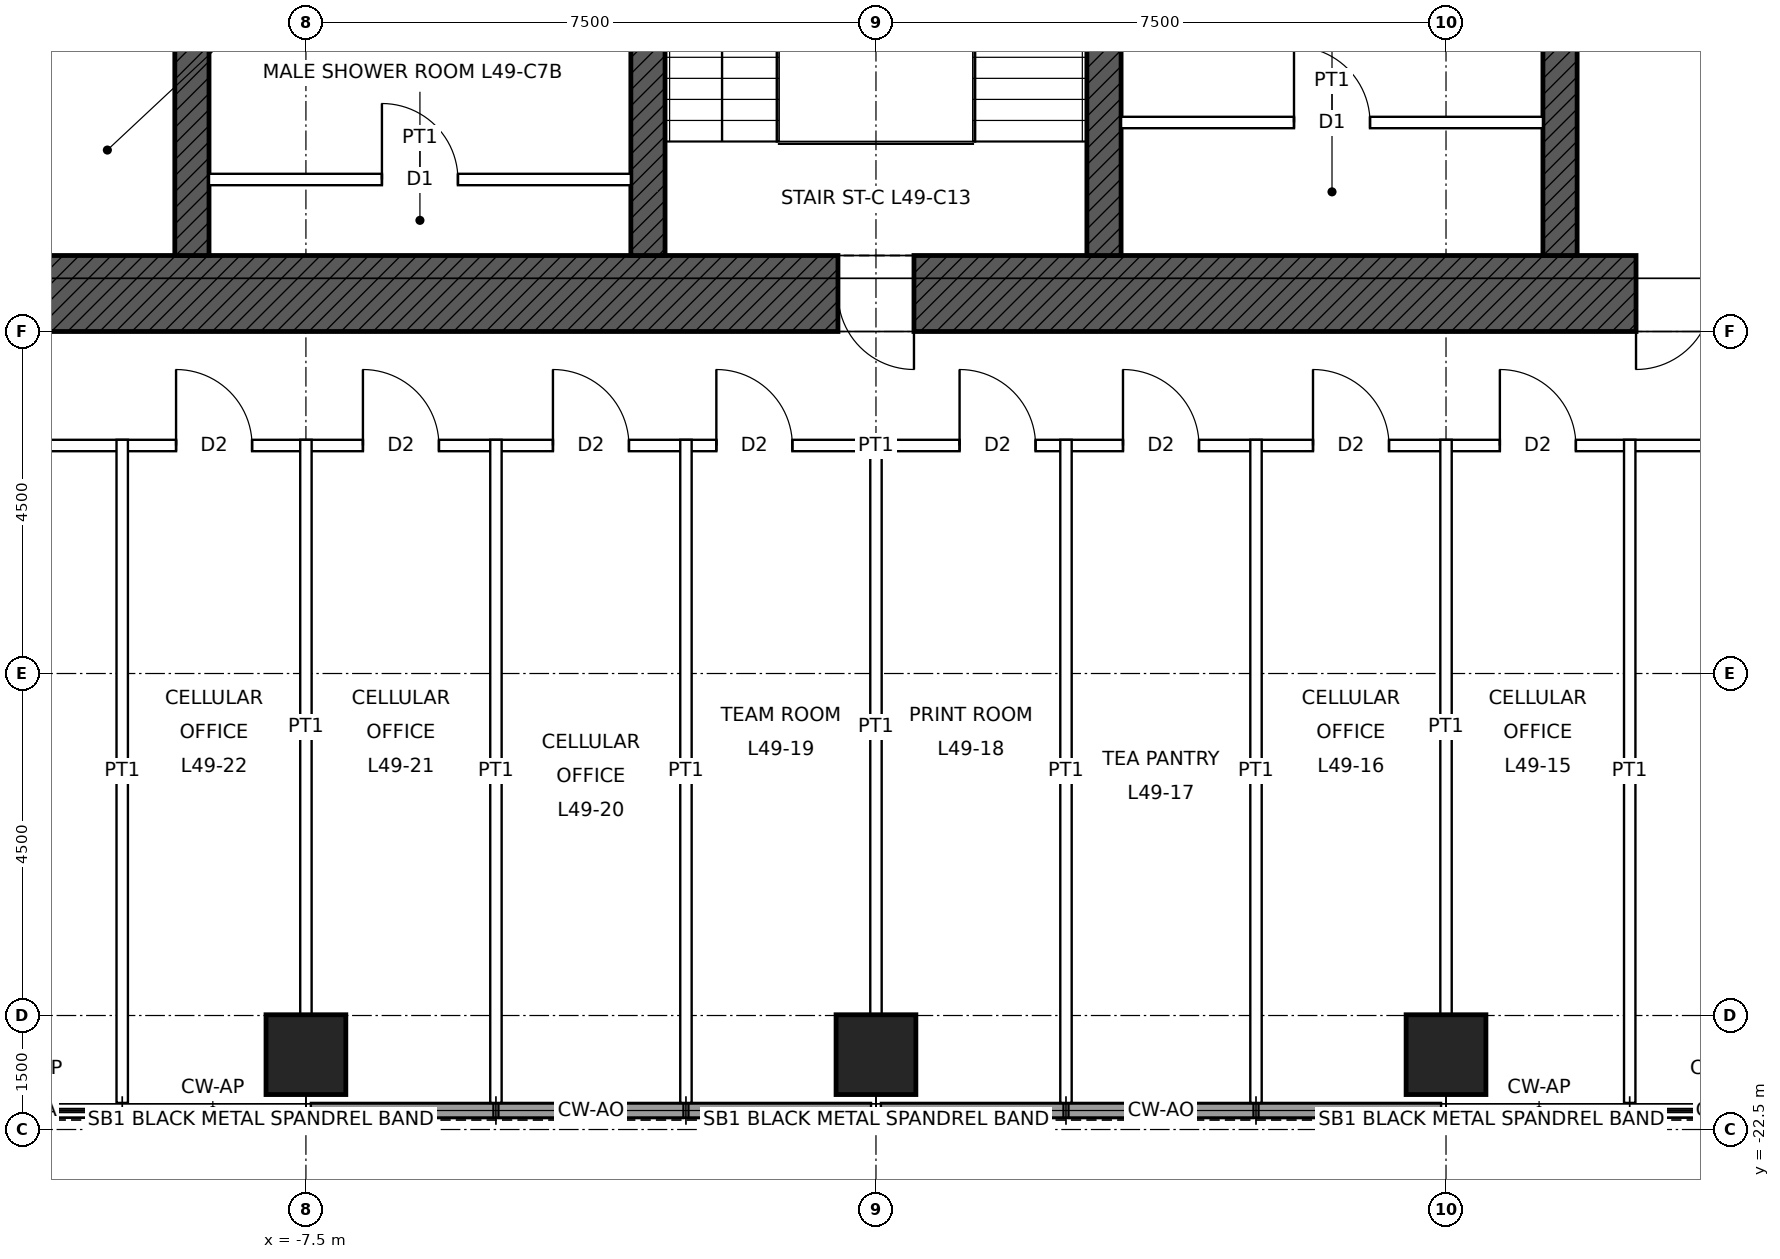
"""IFC4 building model, lengths in metres.
Left out: names, types, materials, properties, quantities, classifications, styles, units other than length and angle.
Written with IfcOpenShell. Run it as: python <this file> out.ifc"""

import sys

from ifc_helpers import new_model, si_unit, direction, frame, frame_2d, origin, origin_2d, place, context, subcontext, project, spatial, rectangle, hollow_rectangle, extrude, element, fill, save


model = new_model("IFC4")
c1 = context("Model", 3, precision=1e-05, world=origin(), true_north=direction((0.0, 1.0)))
c2 = subcontext(c1, "Body", "Model", "MODEL_VIEW")
j1 = project(units=[si_unit("LENGTHUNIT", "METRE"), si_unit("PLANEANGLEUNIT", "RADIAN")], contexts=[c1])
p1 = place(None, origin())
s1 = spatial("IfcSite", under=j1, at=p1, CompositionType="ELEMENT")
p2 = place(p1, origin())
s2 = spatial("IfcBuilding", under=s1, at=p2, CompositionType="ELEMENT")
p3 = place(p2, frame((0.0, 0.0, 229.9)))
s3 = spatial("IfcBuildingStorey", under=s2, at=p3, CompositionType="ELEMENT", Elevation=229.9)
for number, where, z_axis, x_axis in (
    (1, (7.5, -21.515, 0.0), (0.0, 0.0, 1.0), (1.0, 0.0, 0.0)),
    (2, (0.0, -21.515, 0.0), (0.0, 0.0, 1.0), (1.0, 0.0, 0.0)),
    (3, (-7.5, -21.515, 0.0), (0.0, 0.0, 1.0), (1.0, 0.0, 0.0)),
):
    element("IfcColumn", number, at=place(p3, frame(where, z_axis=z_axis, x_axis=x_axis)), inside=s3, PredefinedType="COLUMN", context=c2, shape_type="SweptSolid", body=[
        extrude(hollow_rectangle(XDim=1.05, YDim=1.05, WallThickness=0.07, at=origin_2d()), origin(), (0.0, 0.0, 1.0), 4.0),
    ])
p4 = place(p3, frame((12.0, -11.5, 0.0), z_axis=(0.0, 0.0, 1.0), x_axis=(-1.0, 0.0, 0.0)))
e4 = element("IfcWall", 4, at=p4, inside=s3, PredefinedType="SHEAR", context=c2, shape_type="SweptSolid", body=[
    extrude(rectangle(XDim=24.0, YDim=1.0, at=frame_2d((12.0, 0.0))), origin(), (0.0, 0.0, 1.0), 4.0),
])
p5 = place(p4, frame((11.5, 0.0, 0.0)))
e5 = element("IfcOpeningElement", 5, at=p5, cuts=e4, PredefinedType="OPENING", context=c2, shape_type="SweptSolid", body=[
    extrude(rectangle(XDim=1.0, YDim=2.1, at=frame_2d((0.5, 1.05))), frame((0.0, 0.51, 0.0), z_axis=(0.0, -1.0, 0.0), x_axis=(1.0, 0.0, 0.0)), (0.0, 0.0, 1.0), 1.02),
])
p6 = place(p4, frame((1.0, 0.0, 0.0)))
e6 = element("IfcOpeningElement", 6, at=p6, cuts=e4, PredefinedType="OPENING", context=c2, shape_type="SweptSolid", body=[
    extrude(rectangle(XDim=1.0, YDim=2.4, at=frame_2d((0.5, 1.2))), frame((0.0, 0.51, 0.0), z_axis=(0.0, -1.0, 0.0), x_axis=(1.0, 0.0, 0.0)), (0.0, 0.0, 1.0), 1.02),
])
p7 = place(p3, frame((-9.0, -11.0, 0.0), z_axis=(0.0, 0.0, 1.0), x_axis=(0.0, 1.0, 0.0)))
e7 = element("IfcWall", 7, at=p7, inside=s3, PredefinedType="SHEAR", context=c2, shape_type="SweptSolid", body=[
    extrude(rectangle(XDim=6.5, YDim=0.45, at=frame_2d((3.25, 0.0))), origin(), (0.0, 0.0, 1.0), 4.0),
])
p8 = place(p7, frame((4.25, 0.0, 0.0)))
e8 = element("IfcOpeningElement", 8, at=p8, cuts=e7, PredefinedType="OPENING", context=c2, shape_type="SweptSolid", body=[
    extrude(rectangle(XDim=1.0, YDim=2.1, at=frame_2d((0.5, 1.05))), frame((0.0, 0.235, 0.0), z_axis=(0.0, -1.0, 0.0), x_axis=(1.0, 0.0, 0.0)), (0.0, 0.0, 1.0), 0.47),
])
p9 = place(p3, frame((9.0, -11.0, 0.0), z_axis=(0.0, 0.0, 1.0), x_axis=(0.0, 1.0, 0.0)))
e9 = element("IfcWall", 9, at=p9, inside=s3, PredefinedType="SHEAR", context=c2, shape_type="SweptSolid", body=[
    extrude(rectangle(XDim=6.5, YDim=0.45, at=frame_2d((3.25, 0.0))), origin(), (0.0, 0.0, 1.0), 4.0),
])
p10 = place(p9, frame((4.25, 0.0, 0.0)))
e10 = element("IfcOpeningElement", 10, at=p10, cuts=e9, PredefinedType="OPENING", context=c2, shape_type="SweptSolid", body=[
    extrude(rectangle(XDim=1.0, YDim=2.1, at=frame_2d((0.5, 1.05))), frame((0.0, 0.235, 0.0), z_axis=(0.0, -1.0, 0.0), x_axis=(1.0, 0.0, 0.0)), (0.0, 0.0, 1.0), 0.47),
])
for number, where, z_axis, x_axis in (
    (11, (-3.0, -11.0, 0.0), (0.0, 0.0, 1.0), (0.0, 1.0, 0.0)),
    (12, (3.0, -11.0, 0.0), (0.0, 0.0, 1.0), (0.0, 1.0, 0.0)),
):
    element("IfcWall", number, at=place(p3, frame(where, z_axis=z_axis, x_axis=x_axis)), inside=s3, PredefinedType="SHEAR", context=c2, shape_type="SweptSolid", body=[
        extrude(rectangle(XDim=6.5, YDim=0.45, at=frame_2d((3.25, 0.0))), origin(), (0.0, 0.0, 1.0), 4.0),
    ])
p11 = place(p3, frame((7.435, -22.25, 0.0), z_axis=(0.0, 0.0, 1.0), x_axis=(-1.0, 0.0, 0.0)))
e13 = element("IfcWall", 13, at=p11, inside=s3, PredefinedType="SOLIDWALL", context=c2, shape_type="SweptSolid", body=[
    extrude(rectangle(XDim=2.403, YDim=0.2, at=frame_2d((1.201, 0.0))), origin(), (0.0, 0.0, 1.0), 3.85),
])
p12 = place(p3, frame((4.968, -22.25, 0.0), z_axis=(0.0, 0.0, 1.0), x_axis=(-1.0, 0.0, 0.0)))
e14 = element("IfcWall", 14, at=p12, inside=s3, PredefinedType="SOLIDWALL", context=c2, shape_type="SweptSolid", body=[
    extrude(rectangle(XDim=2.435, YDim=0.2, at=frame_2d((1.218, 0.0))), origin(), (0.0, 0.0, 1.0), 3.85),
])
for number, where, z_axis, x_axis in (
    (15, (2.468, -22.25, 0.0), (0.0, 0.0, 1.0), (-1.0, 0.0, 0.0)),
    (16, (-0.065, -22.25, 0.0), (0.0, 0.0, 1.0), (-1.0, 0.0, 0.0)),
):
    element("IfcWall", number, at=place(p3, frame(where, z_axis=z_axis, x_axis=x_axis)), inside=s3, PredefinedType="SOLIDWALL", context=c2, shape_type="SweptSolid", body=[
        extrude(rectangle(XDim=2.403, YDim=0.2, at=frame_2d((1.201, 0.0))), origin(), (0.0, 0.0, 1.0), 3.85),
    ])
p13 = place(p3, frame((-2.532, -22.25, 0.0), z_axis=(0.0, 0.0, 1.0), x_axis=(-1.0, 0.0, 0.0)))
e17 = element("IfcWall", 17, at=p13, inside=s3, PredefinedType="SOLIDWALL", context=c2, shape_type="SweptSolid", body=[
    extrude(rectangle(XDim=2.435, YDim=0.2, at=frame_2d((1.218, 0.0))), origin(), (0.0, 0.0, 1.0), 3.85),
])
p14 = place(p3, frame((-5.032, -22.25, 0.0), z_axis=(0.0, 0.0, 1.0), x_axis=(-1.0, 0.0, 0.0)))
e18 = element("IfcWall", 18, at=p14, inside=s3, PredefinedType="SOLIDWALL", context=c2, shape_type="SweptSolid", body=[
    extrude(rectangle(XDim=2.403, YDim=0.2, at=frame_2d((1.201, 0.0))), origin(), (0.0, 0.0, 1.0), 3.85),
])
p15 = place(p3, frame((-13.575, -13.5, 0.0), z_axis=(0.0, 0.0, 1.0), x_axis=(1.0, 0.0, 0.0)))
e19 = element("IfcWall", 19, at=p15, inside=s3, PredefinedType="PARTITIONING", context=c2, shape_type="SweptSolid", body=[
    extrude(rectangle(XDim=27.15, YDim=0.15, at=frame_2d((13.575, 0.0))), origin(), (0.0, 0.0, 1.0), 3.85),
])
p16 = place(p15, frame((21.783, 0.0, 0.0)))
e20 = element("IfcOpeningElement", 20, at=p16, cuts=e19, PredefinedType="OPENING", context=c2, shape_type="SweptSolid", body=[
    extrude(rectangle(XDim=1.0, YDim=2.1, at=frame_2d((0.5, 1.05))), frame((0.0, 0.085, 0.0), z_axis=(0.0, -1.0, 0.0), x_axis=(1.0, 0.0, 0.0)), (0.0, 0.0, 1.0), 0.17),
])
p17 = place(p15, frame((19.325, 0.0, 0.0)))
e21 = element("IfcOpeningElement", 21, at=p17, cuts=e19, PredefinedType="OPENING", context=c2, shape_type="SweptSolid", body=[
    extrude(rectangle(XDim=1.0, YDim=2.1, at=frame_2d((0.5, 1.05))), frame((0.0, 0.085, 0.0), z_axis=(0.0, -1.0, 0.0), x_axis=(1.0, 0.0, 0.0)), (0.0, 0.0, 1.0), 0.17),
])
p18 = place(p15, frame((16.825, 0.0, 0.0)))
e22 = element("IfcOpeningElement", 22, at=p18, cuts=e19, PredefinedType="OPENING", context=c2, shape_type="SweptSolid", body=[
    extrude(rectangle(XDim=1.0, YDim=2.1, at=frame_2d((0.5, 1.05))), frame((0.0, 0.085, 0.0), z_axis=(0.0, -1.0, 0.0), x_axis=(1.0, 0.0, 0.0)), (0.0, 0.0, 1.0), 0.17),
])
p19 = place(p15, frame((14.675, 0.0, 0.0)))
e23 = element("IfcOpeningElement", 23, at=p19, cuts=e19, PredefinedType="OPENING", context=c2, shape_type="SweptSolid", body=[
    extrude(rectangle(XDim=1.0, YDim=2.1, at=frame_2d((0.5, 1.05))), frame((0.0, 0.085, 0.0), z_axis=(0.0, -1.0, 0.0), x_axis=(1.0, 0.0, 0.0)), (0.0, 0.0, 1.0), 0.17),
])
p20 = place(p15, frame((11.475, 0.0, 0.0)))
e24 = element("IfcOpeningElement", 24, at=p20, cuts=e19, PredefinedType="OPENING", context=c2, shape_type="SweptSolid", body=[
    extrude(rectangle(XDim=1.0, YDim=2.1, at=frame_2d((0.5, 1.05))), frame((0.0, 0.085, 0.0), z_axis=(0.0, -1.0, 0.0), x_axis=(1.0, 0.0, 0.0)), (0.0, 0.0, 1.0), 0.17),
])
p21 = place(p15, frame((9.325, 0.0, 0.0)))
e25 = element("IfcOpeningElement", 25, at=p21, cuts=e19, PredefinedType="OPENING", context=c2, shape_type="SweptSolid", body=[
    extrude(rectangle(XDim=1.0, YDim=2.1, at=frame_2d((0.5, 1.05))), frame((0.0, 0.085, 0.0), z_axis=(0.0, -1.0, 0.0), x_axis=(1.0, 0.0, 0.0)), (0.0, 0.0, 1.0), 0.17),
])
p22 = place(p15, frame((6.825, 0.0, 0.0)))
e26 = element("IfcOpeningElement", 26, at=p22, cuts=e19, PredefinedType="OPENING", context=c2, shape_type="SweptSolid", body=[
    extrude(rectangle(XDim=1.0, YDim=2.1, at=frame_2d((0.5, 1.05))), frame((0.0, 0.085, 0.0), z_axis=(0.0, -1.0, 0.0), x_axis=(1.0, 0.0, 0.0)), (0.0, 0.0, 1.0), 0.17),
])
p23 = place(p15, frame((4.366, 0.0, 0.0)))
e27 = element("IfcOpeningElement", 27, at=p23, cuts=e19, PredefinedType="OPENING", context=c2, shape_type="SweptSolid", body=[
    extrude(rectangle(XDim=1.0, YDim=2.1, at=frame_2d((0.5, 1.05))), frame((0.0, 0.085, 0.0), z_axis=(0.0, -1.0, 0.0), x_axis=(1.0, 0.0, 0.0)), (0.0, 0.0, 1.0), 0.17),
])
p24 = place(p15, frame((25.318, 0.0, 0.0)))
e28 = element("IfcOpeningElement", 28, at=p24, cuts=e19, PredefinedType="OPENING", context=c2, shape_type="SweptSolid", body=[
    extrude(rectangle(XDim=1.0, YDim=2.4, at=frame_2d((0.5, 1.2))), frame((0.0, 0.085, 0.0), z_axis=(0.0, -1.0, 0.0), x_axis=(1.0, 0.0, 0.0)), (0.0, 0.0, 1.0), 0.17),
])
p25 = place(p15, frame((1.366, 0.0, 0.0)))
e29 = element("IfcOpeningElement", 29, at=p25, cuts=e19, PredefinedType="OPENING", context=c2, shape_type="SweptSolid", body=[
    extrude(rectangle(XDim=1.0, YDim=2.4, at=frame_2d((0.5, 1.2))), frame((0.0, 0.085, 0.0), z_axis=(0.0, -1.0, 0.0), x_axis=(1.0, 0.0, 0.0)), (0.0, 0.0, 1.0), 0.17),
])
p26 = place(p3, frame((-9.917, -22.15, 0.0), z_axis=(0.0, 0.0, 1.0), x_axis=(0.0, 1.0, 0.0)))
e30 = element("IfcWall", 30, at=p26, inside=s3, PredefinedType="PARTITIONING", context=c2, shape_type="SweptSolid", body=[
    extrude(rectangle(XDim=8.725, YDim=0.15, at=frame_2d((4.362, 0.0))), origin(), (0.0, 0.0, 1.0), 3.85),
])
p27 = place(p3, frame((-7.5, -20.99, 0.0), z_axis=(0.0, 0.0, 1.0), x_axis=(0.0, 1.0, 0.0)))
e31 = element("IfcWall", 31, at=p27, inside=s3, PredefinedType="PARTITIONING", context=c2, shape_type="SweptSolid", body=[
    extrude(rectangle(XDim=7.565, YDim=0.15, at=frame_2d((3.782, 0.0))), origin(), (0.0, 0.0, 1.0), 3.238),
])
for number, where, z_axis, x_axis in (
    (32, (-5.0, -22.15, 0.0), (0.0, 0.0, 1.0), (0.0, 1.0, 0.0)),
    (33, (-2.5, -22.15, 0.0), (0.0, 0.0, 1.0), (0.0, 1.0, 0.0)),
):
    element("IfcWall", number, at=place(p3, frame(where, z_axis=z_axis, x_axis=x_axis)), inside=s3, PredefinedType="PARTITIONING", context=c2, shape_type="SweptSolid", body=[
        extrude(rectangle(XDim=8.725, YDim=0.15, at=frame_2d((4.362, 0.0))), origin(), (0.0, 0.0, 1.0), 3.85),
    ])
p28 = place(p3, frame((0.0, -20.99, 0.0), z_axis=(0.0, 0.0, 1.0), x_axis=(0.0, 1.0, 0.0)))
e34 = element("IfcWall", 34, at=p28, inside=s3, PredefinedType="PARTITIONING", context=c2, shape_type="SweptSolid", body=[
    extrude(rectangle(XDim=7.565, YDim=0.15, at=frame_2d((3.782, 0.0))), origin(), (0.0, 0.0, 1.0), 3.238),
])
for number, where, z_axis, x_axis in (
    (35, (2.5, -22.15, 0.0), (0.0, 0.0, 1.0), (0.0, 1.0, 0.0)),
    (36, (5.0, -22.15, 0.0), (0.0, 0.0, 1.0), (0.0, 1.0, 0.0)),
):
    element("IfcWall", number, at=place(p3, frame(where, z_axis=z_axis, x_axis=x_axis)), inside=s3, PredefinedType="PARTITIONING", context=c2, shape_type="SweptSolid", body=[
        extrude(rectangle(XDim=8.725, YDim=0.15, at=frame_2d((4.362, 0.0))), origin(), (0.0, 0.0, 1.0), 3.85),
    ])
p29 = place(p3, frame((7.5, -20.99, 0.0), z_axis=(0.0, 0.0, 1.0), x_axis=(0.0, 1.0, 0.0)))
e37 = element("IfcWall", 37, at=p29, inside=s3, PredefinedType="PARTITIONING", context=c2, shape_type="SweptSolid", body=[
    extrude(rectangle(XDim=7.565, YDim=0.15, at=frame_2d((3.782, 0.0))), origin(), (0.0, 0.0, 1.0), 3.238),
])
p30 = place(p3, frame((9.917, -22.15, 0.0), z_axis=(0.0, 0.0, 1.0), x_axis=(0.0, 1.0, 0.0)))
e38 = element("IfcWall", 38, at=p30, inside=s3, PredefinedType="PARTITIONING", context=c2, shape_type="SweptSolid", body=[
    extrude(rectangle(XDim=8.725, YDim=0.15, at=frame_2d((4.362, 0.0))), origin(), (0.0, 0.0, 1.0), 3.85),
])
p31 = place(p3, frame((-8.775, -10.0, 0.0), z_axis=(0.0, 0.0, 1.0), x_axis=(1.0, 0.0, 0.0)))
e39 = element("IfcWall", 39, at=p31, inside=s3, PredefinedType="PARTITIONING", context=c2, shape_type="SweptSolid", body=[
    extrude(rectangle(XDim=5.55, YDim=0.15, at=frame_2d((2.775, 0.0))), origin(), (0.0, 0.0, 1.0), 3.75),
])
p32 = place(p31, frame((2.275, 0.0, 0.0)))
e40 = element("IfcOpeningElement", 40, at=p32, cuts=e39, PredefinedType="OPENING", context=c2, shape_type="SweptSolid", body=[
    extrude(rectangle(XDim=1.0, YDim=2.1, at=frame_2d((0.5, 1.05))), frame((0.0, 0.085, 0.0), z_axis=(0.0, -1.0, 0.0), x_axis=(1.0, 0.0, 0.0)), (0.0, 0.0, 1.0), 0.17),
])
p33 = place(p3, frame((3.225, -9.25, 0.0), z_axis=(0.0, 0.0, 1.0), x_axis=(1.0, 0.0, 0.0)))
e41 = element("IfcWall", 41, at=p33, inside=s3, PredefinedType="PARTITIONING", context=c2, shape_type="SweptSolid", body=[
    extrude(rectangle(XDim=5.55, YDim=0.15, at=frame_2d((2.775, 0.0))), origin(), (0.0, 0.0, 1.0), 3.75),
])
p34 = place(p33, frame((2.275, 0.0, 0.0)))
e42 = element("IfcOpeningElement", 42, at=p34, cuts=e41, PredefinedType="OPENING", context=c2, shape_type="SweptSolid", body=[
    extrude(rectangle(XDim=1.0, YDim=2.1, at=frame_2d((0.5, 1.05))), frame((0.0, 0.085, 0.0), z_axis=(0.0, -1.0, 0.0), x_axis=(1.0, 0.0, 0.0)), (0.0, 0.0, 1.0), 0.17),
])
p35 = place(p5, origin())
e43 = element("IfcDoor", 43, at=p35, inside=s3, OperationType="SINGLE_SWING_LEFT", PredefinedType="DOOR", context=c2, shape_type="SweptSolid", body=[
    extrude(rectangle(XDim=1.0, YDim=2.1, at=frame_2d((0.5, 1.05))), frame((0.0, 0.485, 0.0), z_axis=(0.0, -1.0, 0.0), x_axis=(1.0, 0.0, 0.0)), (0.0, 0.0, 1.0), 0.05),
])
fill(e5, e43)
p36 = place(p6, origin())
e44 = element("IfcDoor", 44, at=p36, inside=s3, OperationType="SINGLE_SWING_RIGHT", PredefinedType="DOOR", context=c2, shape_type="SweptSolid", body=[
    extrude(rectangle(XDim=1.0, YDim=2.4, at=frame_2d((0.5, 1.2))), frame((0.0, 0.485, 0.0), z_axis=(0.0, -1.0, 0.0), x_axis=(1.0, 0.0, 0.0)), (0.0, 0.0, 1.0), 0.05),
])
fill(e6, e44)
p37 = place(p32, origin())
e45 = element("IfcDoor", 45, at=p37, inside=s3, OperationType="SINGLE_SWING_LEFT", PredefinedType="DOOR", context=c2, shape_type="SweptSolid", body=[
    extrude(rectangle(XDim=1.0, YDim=2.1, at=frame_2d((0.5, 1.05))), frame((0.0, 0.025, 0.0), z_axis=(0.0, -1.0, 0.0), x_axis=(1.0, 0.0, 0.0)), (0.0, 0.0, 1.0), 0.05),
])
fill(e40, e45)
p38 = place(p34, origin())
e46 = element("IfcDoor", 46, at=p38, inside=s3, OperationType="SINGLE_SWING_LEFT", PredefinedType="DOOR", context=c2, shape_type="SweptSolid", body=[
    extrude(rectangle(XDim=1.0, YDim=2.1, at=frame_2d((0.5, 1.05))), frame((0.0, 0.025, 0.0), z_axis=(0.0, -1.0, 0.0), x_axis=(1.0, 0.0, 0.0)), (0.0, 0.0, 1.0), 0.05),
])
fill(e42, e46)
p39 = place(p16, origin())
e47 = element("IfcDoor", 47, at=p39, inside=s3, OperationType="SINGLE_SWING_LEFT", PredefinedType="DOOR", context=c2, shape_type="SweptSolid", body=[
    extrude(rectangle(XDim=1.0, YDim=2.1, at=frame_2d((0.5, 1.05))), frame((0.0, 0.025, 0.0), z_axis=(0.0, -1.0, 0.0), x_axis=(1.0, 0.0, 0.0)), (0.0, 0.0, 1.0), 0.05),
])
fill(e20, e47)
p40 = place(p17, origin())
e48 = element("IfcDoor", 48, at=p40, inside=s3, OperationType="SINGLE_SWING_LEFT", PredefinedType="DOOR", context=c2, shape_type="SweptSolid", body=[
    extrude(rectangle(XDim=1.0, YDim=2.1, at=frame_2d((0.5, 1.05))), frame((0.0, 0.025, 0.0), z_axis=(0.0, -1.0, 0.0), x_axis=(1.0, 0.0, 0.0)), (0.0, 0.0, 1.0), 0.05),
])
fill(e21, e48)
p41 = place(p18, origin())
e49 = element("IfcDoor", 49, at=p41, inside=s3, OperationType="SINGLE_SWING_LEFT", PredefinedType="DOOR", context=c2, shape_type="SweptSolid", body=[
    extrude(rectangle(XDim=1.0, YDim=2.1, at=frame_2d((0.5, 1.05))), frame((0.0, 0.025, 0.0), z_axis=(0.0, -1.0, 0.0), x_axis=(1.0, 0.0, 0.0)), (0.0, 0.0, 1.0), 0.05),
])
fill(e22, e49)
p42 = place(p19, origin())
e50 = element("IfcDoor", 50, at=p42, inside=s3, OperationType="SINGLE_SWING_LEFT", PredefinedType="DOOR", context=c2, shape_type="SweptSolid", body=[
    extrude(rectangle(XDim=1.0, YDim=2.1, at=frame_2d((0.5, 1.05))), frame((0.0, 0.025, 0.0), z_axis=(0.0, -1.0, 0.0), x_axis=(1.0, 0.0, 0.0)), (0.0, 0.0, 1.0), 0.05),
])
fill(e23, e50)
p43 = place(p20, origin())
e51 = element("IfcDoor", 51, at=p43, inside=s3, OperationType="SINGLE_SWING_LEFT", PredefinedType="DOOR", context=c2, shape_type="SweptSolid", body=[
    extrude(rectangle(XDim=1.0, YDim=2.1, at=frame_2d((0.5, 1.05))), frame((0.0, 0.025, 0.0), z_axis=(0.0, -1.0, 0.0), x_axis=(1.0, 0.0, 0.0)), (0.0, 0.0, 1.0), 0.05),
])
fill(e24, e51)
p44 = place(p21, origin())
e52 = element("IfcDoor", 52, at=p44, inside=s3, OperationType="SINGLE_SWING_LEFT", PredefinedType="DOOR", context=c2, shape_type="SweptSolid", body=[
    extrude(rectangle(XDim=1.0, YDim=2.1, at=frame_2d((0.5, 1.05))), frame((0.0, 0.025, 0.0), z_axis=(0.0, -1.0, 0.0), x_axis=(1.0, 0.0, 0.0)), (0.0, 0.0, 1.0), 0.05),
])
fill(e25, e52)
p45 = place(p22, origin())
e53 = element("IfcDoor", 53, at=p45, inside=s3, OperationType="SINGLE_SWING_LEFT", PredefinedType="DOOR", context=c2, shape_type="SweptSolid", body=[
    extrude(rectangle(XDim=1.0, YDim=2.1, at=frame_2d((0.5, 1.05))), frame((0.0, 0.025, 0.0), z_axis=(0.0, -1.0, 0.0), x_axis=(1.0, 0.0, 0.0)), (0.0, 0.0, 1.0), 0.05),
])
fill(e26, e53)
p46 = place(p23, origin())
e54 = element("IfcDoor", 54, at=p46, inside=s3, OperationType="SINGLE_SWING_LEFT", PredefinedType="DOOR", context=c2, shape_type="SweptSolid", body=[
    extrude(rectangle(XDim=1.0, YDim=2.1, at=frame_2d((0.5, 1.05))), frame((0.0, 0.025, 0.0), z_axis=(0.0, -1.0, 0.0), x_axis=(1.0, 0.0, 0.0)), (0.0, 0.0, 1.0), 0.05),
])
fill(e27, e54)
save(model, sys.argv[1])
